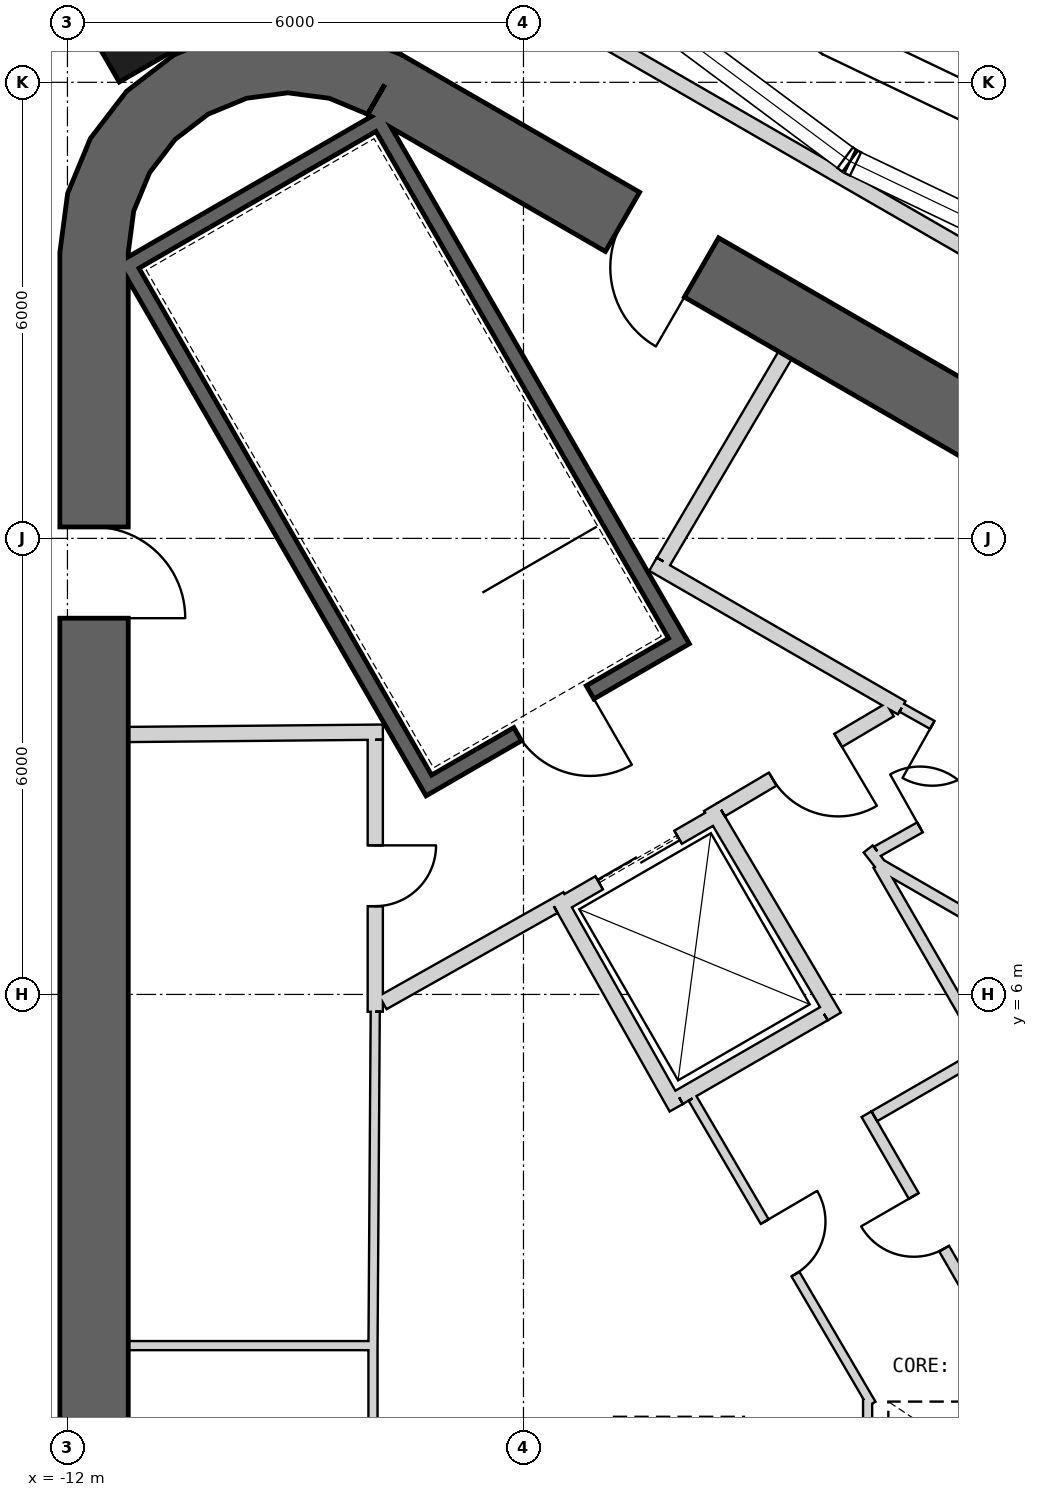
"""IFC4 building model, lengths in metres.
Left out: names, types, materials, properties, quantities, classifications, styles, units other than length and angle.
Written with IfcOpenShell. Run it as: python <this file> out.ifc"""

import sys

from ifc_helpers import new_model, si_unit, direction, frame, frame_2d, origin, origin_2d, place, context, subcontext, project, spatial, polyline, rectangle, outline, extrude, element, fill, save


model = new_model("IFC4")
c1 = context("Model", 3, precision=1e-05, world=origin(), true_north=direction((0.0, 1.0)))
c2 = subcontext(c1, "Body", "Model", "MODEL_VIEW")
j1 = project(units=[si_unit("LENGTHUNIT", "METRE"), si_unit("PLANEANGLEUNIT", "RADIAN")], contexts=[c1])
p1 = place(None, origin())
s1 = spatial("IfcSite", under=j1, at=p1, CompositionType="ELEMENT")
p2 = place(p1, origin())
s2 = spatial("IfcBuilding", under=s1, at=p2, CompositionType="ELEMENT")
p3 = place(p2, frame((0.0, 0.0, 440.3)))
s3 = spatial("IfcBuildingStorey", under=s2, at=p3, CompositionType="ELEMENT", Elevation=440.3)
p4 = place(p3, frame((-11.025, 19.097, 0.0), z_axis=(0.0, 0.0, 1.0), x_axis=(-0.5, 0.866025403784, 0.0)))
e1 = element("IfcColumn", 1, at=p4, inside=s3, PredefinedType="COLUMN", context=c2, shape_type="SweptSolid", body=[
    extrude(rectangle(XDim=1.6, YDim=1.6, at=origin_2d()), origin(), (0.0, 0.0, 1.0), 4.7),
])
p5 = place(p3, frame((19.475, 2.208, 0.0), z_axis=(0.0, 0.0, 1.0), x_axis=(-0.866028369851, 0.499994862586, 0.0)))
e2 = element("IfcWall", 2, at=p5, inside=s3, PredefinedType="SHEAR", context=c2, shape_type="SweptSolid", body=[
    extrude(rectangle(XDim=31.523, YDim=0.9, at=frame_2d((15.762, 0.0))), origin(), (0.0, 0.0, 1.0), 4.7),
])
p6 = place(p5, frame((3.612, 0.0, 0.0)))
e3 = element("IfcOpeningElement", 3, at=p6, cuts=e2, PredefinedType="OPENING", context=c2, shape_type="SweptSolid", body=[
    extrude(rectangle(XDim=1.2, YDim=2.4, at=frame_2d((0.6, 1.2))), frame((0.0, 0.46, 0.0), z_axis=(0.0, -1.0, 0.0), x_axis=(1.0, 0.0, 0.0)), (0.0, 0.0, 1.0), 0.92),
])
p7 = place(p5, frame((26.712, 0.0, 0.0)))
e4 = element("IfcOpeningElement", 4, at=p7, cuts=e2, PredefinedType="OPENING", context=c2, shape_type="SweptSolid", body=[
    extrude(rectangle(XDim=1.2, YDim=2.4, at=frame_2d((0.6, 1.2))), frame((0.0, 0.46, 0.0), z_axis=(0.0, -1.0, 0.0), x_axis=(1.0, 0.0, 0.0)), (0.0, 0.0, 1.0), 0.92),
])
p8 = place(p3, frame((-11.65, 15.762, 0.0), z_axis=(0.0, 0.0, 1.0), x_axis=(0.0, -1.0, 0.0)))
e5 = element("IfcWall", 5, at=p8, inside=s3, PredefinedType="SHEAR", context=c2, shape_type="SweptSolid", body=[
    extrude(rectangle(XDim=31.523, YDim=0.9, at=frame_2d((15.762, 0.0))), origin(), (0.0, 0.0, 1.0), 4.7),
])
p9 = place(p8, frame((3.612, 0.0, 0.0)))
e6 = element("IfcOpeningElement", 6, at=p9, cuts=e5, PredefinedType="OPENING", context=c2, shape_type="SweptSolid", body=[
    extrude(rectangle(XDim=1.2, YDim=2.4, at=frame_2d((0.6, 1.2))), frame((0.0, 0.46, 0.0), z_axis=(0.0, -1.0, 0.0), x_axis=(1.0, 0.0, 0.0)), (0.0, 0.0, 1.0), 0.92),
])
p10 = place(p8, frame((26.712, 0.0, 0.0)))
e7 = element("IfcOpeningElement", 7, at=p10, cuts=e5, PredefinedType="OPENING", context=c2, shape_type="SweptSolid", body=[
    extrude(rectangle(XDim=1.2, YDim=2.4, at=frame_2d((0.6, 1.2))), frame((0.0, 0.46, 0.0), z_axis=(0.0, -1.0, 0.0), x_axis=(1.0, 0.0, 0.0)), (0.0, 0.0, 1.0), 0.92),
])
p11 = place(p3, origin())
e8 = element("IfcWall", 8, at=p11, inside=s3, PredefinedType="SHEAR", context=c2, shape_type="SweptSolid", body=[
    extrude(outline(polyline([(-7.6, 18.36), (-8.323, 18.659), (-9.1, 18.762), (-9.876, 18.659), (-10.6, 18.36), (-11.221, 17.883), (-11.698, 17.262), (-11.998, 16.538), (-12.1, 15.762), (-11.2, 15.762), (-11.128, 16.305), (-10.919, 16.812), (-10.585, 17.247), (-10.15, 17.58), (-9.644, 17.79), (-9.1, 17.862), (-8.556, 17.79), (-8.05, 17.58), (-7.6, 18.36)])), origin(), (0.0, 0.0, 1.0), 4.7),
])
p12 = place(p3, frame((-11.245, 15.678, -0.25), z_axis=(0.0, 0.0, 1.0), x_axis=(0.499977274689, -0.866038523851, 0.0)))
e9 = element("IfcWall", 9, at=p12, inside=s3, PredefinedType="SHEAR", context=c2, shape_type="SweptSolid", body=[
    extrude(rectangle(XDim=8.1, YDim=0.2, at=frame_2d((4.05, 0.0))), origin(), (0.0, 0.0, 1.0), 4.95),
])
p13 = place(p3, frame((-7.818, 17.541, -0.25), z_axis=(0.0, 0.0, 1.0), x_axis=(-0.866044365799, -0.499967155389, 0.0)))
e10 = element("IfcWall", 10, at=p13, inside=s3, PredefinedType="SHEAR", context=c2, shape_type="SweptSolid", body=[
    extrude(rectangle(XDim=3.8, YDim=0.2, at=frame_2d((1.9, 0.0))), origin(), (0.0, 0.0, 1.0), 4.95),
])
p14 = place(p3, frame((-7.854, 17.405, -0.25), z_axis=(0.0, 0.0, 1.0), x_axis=(0.499997992926, -0.866026562566, 0.0)))
e11 = element("IfcWall", 11, at=p14, inside=s3, PredefinedType="SHEAR", context=c2, shape_type="SweptSolid", body=[
    extrude(rectangle(XDim=7.9, YDim=0.2, at=frame_2d((3.95, 0.0))), origin(), (0.0, 0.0, 1.0), 4.95),
])
p15 = place(p3, frame((-7.159, 8.8, -0.25), z_axis=(0.0, 0.0, 1.0), x_axis=(0.866047807691, 0.499961193289, 0.0)))
e12 = element("IfcWall", 12, at=p15, inside=s3, PredefinedType="SHEAR", context=c2, shape_type="SweptSolid", body=[
    extrude(rectangle(XDim=3.6, YDim=0.2, at=frame_2d((1.8, 0.0))), origin(), (0.0, 0.0, 1.0), 4.95),
])
p16 = place(p15, frame((1.25, 0.0, 0.25)))
e13 = element("IfcOpeningElement", 13, at=p16, cuts=e12, PredefinedType="OPENING", context=c2, shape_type="SweptSolid", body=[
    extrude(rectangle(XDim=1.1, YDim=2.1, at=frame_2d((0.55, 1.05))), frame((0.0, 0.11, 0.0), z_axis=(0.0, -1.0, 0.0), x_axis=(1.0, 0.0, 0.0)), (0.0, 0.0, 1.0), 0.22),
])
p17 = place(p3, frame((-5.524, 7.168, 0.0), z_axis=(0.0, 0.0, 1.0), x_axis=(0.866024647952, 0.500001309137, 0.0)))
e14 = element("IfcWall", 14, at=p17, inside=s3, PredefinedType="PLUMBINGWALL", context=c2, shape_type="SweptSolid", body=[
    extrude(rectangle(XDim=2.4, YDim=0.2, at=frame_2d((1.2, 0.0))), origin(), (0.0, 0.0, 1.0), 4.7),
])
p18 = place(p17, frame((0.6, 0.0, 0.0)))
e15 = element("IfcOpeningElement", 15, at=p18, cuts=e14, PredefinedType="OPENING", context=c2, shape_type="SweptSolid", body=[
    extrude(rectangle(XDim=1.2, YDim=2.4, at=frame_2d((0.6, 1.2))), frame((0.0, 0.11, 0.0), z_axis=(0.0, -1.0, 0.0), x_axis=(1.0, 0.0, 0.0)), (0.0, 0.0, 1.0), 0.22),
])
p19 = place(p3, frame((-2.047, 5.746, 0.0), z_axis=(0.0, 0.0, 1.0), x_axis=(-0.86605622881, -0.499946605688, 0.0)))
e16 = element("IfcWall", 16, at=p19, inside=s3, PredefinedType="PLUMBINGWALL", context=c2, shape_type="SweptSolid", body=[
    extrude(rectangle(XDim=2.2, YDim=0.2, at=frame_2d((1.1, 0.0))), origin(), (0.0, 0.0, 1.0), 4.7),
])
p20 = place(p3, frame((-3.99, 4.509, 0.0), z_axis=(0.0, 0.0, 1.0), x_axis=(-0.491358283181, 0.870957540612, 0.0)))
e17 = element("IfcWall", 17, at=p20, inside=s3, PredefinedType="PLUMBINGWALL", context=c2, shape_type="SweptSolid", body=[
    extrude(rectangle(XDim=3.2, YDim=0.2, at=frame_2d((1.6, 0.0))), origin(), (0.0, 0.0, 1.0), 4.7),
])
p21 = place(p3, frame((-3.538, 8.465, 0.0), z_axis=(0.0, 0.0, 1.0), x_axis=(0.508616218331, -0.860993346345, 0.0)))
e18 = element("IfcWall", 18, at=p21, inside=s3, PredefinedType="PLUMBINGWALL", context=c2, shape_type="SweptSolid", body=[
    extrude(rectangle(XDim=3.2, YDim=0.2, at=frame_2d((1.6, 0.0))), origin(), (0.0, 0.0, 1.0), 4.7),
])
p22 = place(p3, frame((-11.2, 1.38, 0.0), z_axis=(0.0, 0.0, 1.0), x_axis=(1.0, 0.0, 0.0)))
e19 = element("IfcWall", 19, at=p22, inside=s3, PredefinedType="PARTITIONING", context=c2, shape_type="SweptSolid", body=[
    extrude(rectangle(XDim=3.25, YDim=0.12, at=frame_2d((1.625, 0.0))), origin(), (0.0, 0.0, 1.0), 4.7),
])
p23 = place(p3, frame((-7.85, 9.451, 0.0), z_axis=(0.0, 0.0, 1.0), x_axis=(-0.999957167047, -0.009255488683, 0.0)))
e20 = element("IfcWall", 20, at=p23, inside=s3, PredefinedType="PARTITIONING", context=c2, shape_type="SweptSolid", body=[
    extrude(rectangle(XDim=3.35, YDim=0.2, at=frame_2d((1.675, 0.0))), origin(), (0.0, 0.0, 1.0), 4.7),
])
p24 = place(p3, frame((-7.95, 5.772, 0.0), z_axis=(0.0, 0.0, 1.0), x_axis=(0.0, 1.0, 0.0)))
e21 = element("IfcWall", 21, at=p24, inside=s3, PredefinedType="PARTITIONING", context=c2, shape_type="SweptSolid", body=[
    extrude(rectangle(XDim=3.578, YDim=0.2, at=frame_2d((1.789, 0.0))), origin(), (0.0, 0.0, 1.0), 4.7),
])
p25 = place(p24, frame((1.389, 0.0, 0.0)))
e22 = element("IfcOpeningElement", 22, at=p25, cuts=e21, PredefinedType="OPENING", context=c2, shape_type="SweptSolid", body=[
    extrude(rectangle(XDim=0.8, YDim=2.1, at=frame_2d((0.4, 1.05))), frame((0.0, 0.11, 0.0), z_axis=(0.0, -1.0, 0.0), x_axis=(1.0, 0.0, 0.0)), (0.0, 0.0, 1.0), 0.22),
])
p26 = place(p3, frame((-7.95, 5.772, 0.0), z_axis=(0.0, 0.0, 1.0), x_axis=(-0.006679767059, -0.999977690107, 0.0)))
e23 = element("IfcWall", 23, at=p26, inside=s3, PredefinedType="PARTITIONING", context=c2, shape_type="SweptSolid", body=[
    extrude(rectangle(XDim=4.422, YDim=0.12, at=frame_2d((2.211, 0.0))), origin(), (0.0, 0.0, 1.0), 4.7),
])
p27 = place(p3, frame((-7.98, 1.35, 0.0), z_axis=(0.0, 0.0, 1.0), x_axis=(0.0, -1.0, 0.0)))
e24 = element("IfcWall", 24, at=p27, inside=s3, PredefinedType="PARTITIONING", context=c2, shape_type="SweptSolid", body=[
    extrude(rectangle(XDim=5.4, YDim=0.12, at=frame_2d((2.7, 0.0))), origin(), (0.0, 0.0, 1.0), 4.7),
])
p28 = place(p27, frame((2.3, 0.0, 0.0)))
e25 = element("IfcOpeningElement", 25, at=p28, cuts=e24, PredefinedType="OPENING", context=c2, shape_type="SweptSolid", body=[
    extrude(rectangle(XDim=0.8, YDim=2.1, at=frame_2d((0.4, 1.05))), frame((0.0, 0.07, 0.0), z_axis=(0.0, -1.0, 0.0), x_axis=(1.0, 0.0, 0.0)), (0.0, 0.0, 1.0), 0.14),
])
p29 = place(p3, frame((-4.296, 11.66, 0.0), z_axis=(0.0, 0.0, 1.0), x_axis=(0.866027389382, -0.499996560828, 0.0)))
e26 = element("IfcWall", 26, at=p29, inside=s3, PredefinedType="PARTITIONING", context=c2, shape_type="SweptSolid", body=[
    extrude(rectangle(XDim=3.778, YDim=0.2, at=frame_2d((1.889, 0.0))), origin(), (0.0, 0.0, 1.0), 4.7),
])
p30 = place(p3, frame((-2.558, 14.409, 0.0), z_axis=(0.0, 0.0, 1.0), x_axis=(-0.508018930956, -0.861345903683, 0.0)))
e27 = element("IfcWall", 27, at=p30, inside=s3, PredefinedType="PARTITIONING", context=c2, shape_type="SweptSolid", body=[
    extrude(rectangle(XDim=3.15, YDim=0.2, at=frame_2d((1.575, 0.0))), origin(), (0.0, 0.0, 1.0), 4.7),
])
p31 = place(p3, frame((-1.024, 9.772, 0.0), z_axis=(0.0, 0.0, 1.0), x_axis=(0.871968924608, -0.489561226527, 0.0)))
e28 = element("IfcWall", 28, at=p31, inside=s3, PredefinedType="PARTITIONING", context=c2, shape_type="SweptSolid", body=[
    extrude(rectangle(XDim=1.722, YDim=0.12, at=frame_2d((0.861, 0.0))), origin(), (0.0, 0.0, 1.0), 4.7),
])
p32 = place(p31, frame((0.461, 0.0, 0.0)))
e29 = element("IfcOpeningElement", 29, at=p32, cuts=e28, PredefinedType="OPENING", context=c2, shape_type="SweptSolid", body=[
    extrude(rectangle(XDim=0.8, YDim=2.1, at=frame_2d((0.4, 1.05))), frame((0.0, 0.07, 0.0), z_axis=(0.0, -1.0, 0.0), x_axis=(1.0, 0.0, 0.0)), (0.0, 0.0, 1.0), 0.14),
])
p33 = place(p3, frame((-5.6, 7.16, 0.0), z_axis=(0.0, 0.0, 1.0), x_axis=(-0.871350695252, -0.490660744185, 0.0)))
e30 = element("IfcWall", 30, at=p33, inside=s3, PredefinedType="PARTITIONING", context=c2, shape_type="SweptSolid", body=[
    extrude(rectangle(XDim=2.582, YDim=0.2, at=frame_2d((1.291, 0.0))), origin(), (0.0, 0.0, 1.0), 4.7),
])
p34 = place(p3, frame((-1.179, 9.745, 0.0), z_axis=(0.0, 0.0, 1.0), x_axis=(-0.860630814782, -0.509229418482, 0.0)))
e31 = element("IfcWall", 31, at=p34, inside=s3, PredefinedType="PARTITIONING", context=c2, shape_type="SweptSolid", body=[
    extrude(rectangle(XDim=2.582, YDim=0.2, at=frame_2d((1.291, 0.0))), origin(), (0.0, 0.0, 1.0), 4.7),
])
p35 = place(p34, frame((0.791, 0.0, 0.0)))
e32 = element("IfcOpeningElement", 32, at=p35, cuts=e31, PredefinedType="OPENING", context=c2, shape_type="SweptSolid", body=[
    extrude(rectangle(XDim=1.0, YDim=2.1, at=frame_2d((0.5, 1.05))), frame((0.0, 0.11, 0.0), z_axis=(0.0, -1.0, 0.0), x_axis=(1.0, 0.0, 0.0)), (0.0, 0.0, 1.0), 0.22),
])
p36 = place(p3, frame((-1.42, 0.612, 0.0), z_axis=(0.0, 0.0, 1.0), x_axis=(-0.505492266403, 0.862831135627, 0.0)))
e33 = element("IfcWall", 33, at=p36, inside=s3, PredefinedType="PARTITIONING", context=c2, shape_type="SweptSolid", body=[
    extrude(rectangle(XDim=4.66, YDim=0.12, at=frame_2d((2.33, 0.0))), origin(), (0.0, 0.0, 1.0), 4.7),
])
p37 = place(p36, frame((1.981, 0.0, 0.0)))
e34 = element("IfcOpeningElement", 34, at=p37, cuts=e33, PredefinedType="OPENING", context=c2, shape_type="SweptSolid", body=[
    extrude(rectangle(XDim=0.8, YDim=2.1, at=frame_2d((0.4, 1.05))), frame((0.0, 0.07, 0.0), z_axis=(0.0, -1.0, 0.0), x_axis=(1.0, 0.0, 0.0)), (0.0, 0.0, 1.0), 0.14),
])
p38 = place(p3, frame((-1.472, -0.802, 0.0), z_axis=(0.0, 0.0, 1.0), x_axis=(0.0, 1.0, 0.0)))
e35 = element("IfcWall", 35, at=p38, inside=s3, PredefinedType="PARTITIONING", context=c2, shape_type="SweptSolid", body=[
    extrude(rectangle(XDim=1.484, YDim=0.12, at=frame_2d((0.742, 0.0))), origin(), (0.0, 0.0, 1.0), 4.7),
])
p39 = place(p3, frame((7.367, 2.7, 0.0), z_axis=(0.0, 0.0, 1.0), x_axis=(-0.866027158831, 0.499996960157, 0.0)))
e36 = element("IfcWall", 36, at=p39, inside=s3, PredefinedType="PLUMBINGWALL", context=c2, shape_type="SweptSolid", body=[
    extrude(rectangle(XDim=10.06, YDim=0.15, at=frame_2d((5.03, 0.0))), origin(), (0.0, 0.0, 1.0), 4.7),
])
p40 = place(p3, frame((-1.465, 7.914, 0.0), z_axis=(0.0, 0.0, 1.0), x_axis=(0.613555553277, -0.789651557994, 0.0)))
e37 = element("IfcWall", 37, at=p40, inside=s3, PredefinedType="PLUMBINGWALL", context=c2, shape_type="SweptSolid", body=[
    extrude(rectangle(XDim=0.263, YDim=0.15, at=frame_2d((0.132, 0.0))), origin(), (0.0, 0.0, 1.0), 4.7),
])
p41 = place(p3, frame((0.475, 8.905, 0.0), z_axis=(0.0, 0.0, 1.0), x_axis=(-0.871859457225, -0.489756150392, 0.0)))
e38 = element("IfcWall", 38, at=p41, inside=s3, PredefinedType="PLUMBINGWALL", context=c2, shape_type="SweptSolid", body=[
    extrude(rectangle(XDim=2.089, YDim=0.15, at=frame_2d((1.044, 0.0))), origin(), (0.0, 0.0, 1.0), 4.7),
])
p42 = place(p41, frame((0.644, 0.0, 0.0)))
e39 = element("IfcOpeningElement", 39, at=p42, cuts=e38, PredefinedType="OPENING", context=c2, shape_type="SweptSolid", body=[
    extrude(rectangle(XDim=0.8, YDim=2.1, at=frame_2d((0.4, 1.05))), frame((0.0, 0.085, 0.0), z_axis=(0.0, -1.0, 0.0), x_axis=(1.0, 0.0, 0.0)), (0.0, 0.0, 1.0), 0.17),
])
p43 = place(p3, frame((-1.486, 4.425, 0.0), z_axis=(0.0, 0.0, 1.0), x_axis=(0.499992422807, -0.866029778435, 0.0)))
e40 = element("IfcWall", 40, at=p43, inside=s3, PredefinedType="PLUMBINGWALL", context=c2, shape_type="SweptSolid", body=[
    extrude(rectangle(XDim=3.209, YDim=0.15, at=frame_2d((1.605, 0.0))), origin(), (0.0, 0.0, 1.0), 4.7),
])
p44 = place(p43, frame((1.242, 0.0, 0.0)))
e41 = element("IfcOpeningElement", 41, at=p44, cuts=e40, PredefinedType="OPENING", context=c2, shape_type="SweptSolid", body=[
    extrude(rectangle(XDim=0.8, YDim=2.1, at=frame_2d((0.4, 1.05))), frame((0.0, 0.085, 0.0), z_axis=(0.0, -1.0, 0.0), x_axis=(1.0, 0.0, 0.0)), (0.0, 0.0, 1.0), 0.17),
])
p45 = place(p3, frame((0.153, 5.285, 0.0), z_axis=(0.0, 0.0, 1.0), x_axis=(-0.866059624469, -0.499940723351, 0.0)))
e42 = element("IfcWall", 42, at=p45, inside=s3, PredefinedType="PLUMBINGWALL", context=c2, shape_type="SweptSolid", body=[
    extrude(rectangle(XDim=1.775, YDim=0.15, at=frame_2d((0.888, 0.0))), origin(), (0.0, 0.0, 1.0), 4.7),
])
p46 = place(p3, frame((-1.33, 7.704, 0.0), z_axis=(0.0, 0.0, 1.0), x_axis=(0.499980071345, -0.866036909293, 0.0)))
e43 = element("IfcWall", 43, at=p46, inside=s3, PredefinedType="PLUMBINGWALL", context=c2, shape_type="SweptSolid", body=[
    extrude(rectangle(XDim=2.762, YDim=0.15, at=frame_2d((1.381, 0.0))), origin(), (0.0, 0.0, 1.0), 4.7),
])
p47 = place(p3, frame((20.834, 3.675, 0.0), z_axis=(0.0, 0.0, 1.0), x_axis=(-0.866028536494, 0.499994573949, 0.0)))
e44 = element("IfcWall", 44, at=p47, inside=s3, PredefinedType="PARTITIONING", context=c2, shape_type="SweptSolid", body=[
    extrude(rectangle(XDim=32.411, YDim=0.2, at=frame_2d((16.206, 0.0))), origin(), (0.0, 0.0, 1.0), 4.7),
])
p48 = place(p47, frame((7.7, 0.0, 0.0)))
e45 = element("IfcOpeningElement", 45, at=p48, cuts=e44, PredefinedType="OPENING", context=c2, shape_type="SweptSolid", body=[
    extrude(rectangle(XDim=1.0, YDim=2.1, at=frame_2d((0.5, 1.05))), frame((0.0, 0.11, 0.0), z_axis=(0.0, -1.0, 0.0), x_axis=(1.0, 0.0, 0.0)), (0.0, 0.0, 1.0), 0.22),
])
p49 = place(p47, frame((18.006, 0.0, 0.0)))
e46 = element("IfcOpeningElement", 46, at=p49, cuts=e44, PredefinedType="OPENING", context=c2, shape_type="SweptSolid", body=[
    extrude(rectangle(XDim=1.0, YDim=2.1, at=frame_2d((0.5, 1.05))), frame((0.0, 0.11, 0.0), z_axis=(0.0, -1.0, 0.0), x_axis=(1.0, 0.0, 0.0)), (0.0, 0.0, 1.0), 0.22),
])
p50 = place(p2, frame((0.0, 0.0, 445.3)))
p51 = place(p50, frame((0.0, 0.0, -0.3)))
p52 = place(p51, frame((0.0, -0.157, 0.0)))
p53 = place(p52, frame((0.0, 0.0, 0.25)))
e47 = element("IfcWindow", 47, at=p53, inside=s3, PartitioningType="SINGLE_PANEL", PredefinedType="SKYLIGHT", context=c2, shape_type="SweptSolid", body=[
    extrude(rectangle(XDim=2.4, YDim=1.6, at=origin_2d()), origin(), (0.0, 0.0, 1.0), 0.05),
])
p54 = place(p51, frame((-4.0, -0.157, 0.0)))
p55 = place(p54, frame((0.0, 0.0, 0.25)))
e48 = element("IfcWindow", 48, at=p55, inside=s3, PartitioningType="SINGLE_PANEL", PredefinedType="SKYLIGHT", context=c2, shape_type="SweptSolid", body=[
    extrude(rectangle(XDim=1.8, YDim=1.2, at=origin_2d()), origin(), (0.0, 0.0, 1.0), 0.05),
])
p56 = place(p16, origin())
e49 = element("IfcDoor", 49, at=p56, inside=s3, OperationType="SINGLE_SWING_RIGHT", PredefinedType="USERDEFINED", context=c2, shape_type="SweptSolid", body=[
    extrude(rectangle(XDim=1.1, YDim=2.1, at=frame_2d((0.55, 1.05))), frame((0.0, 0.025, 0.0), z_axis=(0.0, -1.0, 0.0), x_axis=(1.0, 0.0, 0.0)), (0.0, 0.0, 1.0), 0.05),
])
fill(e13, e49)
p57 = place(p35, origin())
e50 = element("IfcDoor", 50, at=p57, inside=s3, OperationType="SINGLE_SWING_LEFT", PredefinedType="USERDEFINED", context=c2, shape_type="SweptSolid", body=[
    extrude(rectangle(XDim=1.0, YDim=2.1, at=frame_2d((0.5, 1.05))), frame((0.0, 0.025, 0.0), z_axis=(0.0, -1.0, 0.0), x_axis=(1.0, 0.0, 0.0)), (0.0, 0.0, 1.0), 0.05),
])
fill(e32, e50)
p58 = place(p18, origin())
e51 = element("IfcDoor", 51, at=p58, inside=s3, OperationType="SLIDING_TO_LEFT", PredefinedType="USERDEFINED", context=c2, shape_type="SweptSolid", body=[
    extrude(rectangle(XDim=1.2, YDim=2.4, at=frame_2d((0.6, 1.2))), frame((0.0, 0.025, 0.0), z_axis=(0.0, -1.0, 0.0), x_axis=(1.0, 0.0, 0.0)), (0.0, 0.0, 1.0), 0.05),
])
fill(e15, e51)
p59 = place(p37, origin())
e52 = element("IfcDoor", 52, at=p59, inside=s3, OperationType="SINGLE_SWING_RIGHT", PredefinedType="USERDEFINED", context=c2, shape_type="SweptSolid", body=[
    extrude(rectangle(XDim=0.8, YDim=2.1, at=frame_2d((0.4, 1.05))), frame((0.0, 0.025, 0.0), z_axis=(0.0, -1.0, 0.0), x_axis=(1.0, 0.0, 0.0)), (0.0, 0.0, 1.0), 0.05),
])
fill(e34, e52)
p60 = place(p42, origin())
e53 = element("IfcDoor", 53, at=p60, inside=s3, OperationType="SINGLE_SWING_RIGHT", PredefinedType="USERDEFINED", context=c2, shape_type="SweptSolid", body=[
    extrude(rectangle(XDim=0.8, YDim=2.1, at=frame_2d((0.4, 1.05))), frame((0.0, 0.025, 0.0), z_axis=(0.0, -1.0, 0.0), x_axis=(1.0, 0.0, 0.0)), (0.0, 0.0, 1.0), 0.05),
])
fill(e39, e53)
p61 = place(p44, origin())
e54 = element("IfcDoor", 54, at=p61, inside=s3, OperationType="SINGLE_SWING_LEFT", PredefinedType="USERDEFINED", context=c2, shape_type="SweptSolid", body=[
    extrude(rectangle(XDim=0.8, YDim=2.1, at=frame_2d((0.4, 1.05))), frame((0.0, 0.025, 0.0), z_axis=(0.0, -1.0, 0.0), x_axis=(1.0, 0.0, 0.0)), (0.0, 0.0, 1.0), 0.05),
])
fill(e41, e54)
p62 = place(p25, origin())
e55 = element("IfcDoor", 55, at=p62, inside=s3, OperationType="SINGLE_SWING_RIGHT", PredefinedType="USERDEFINED", context=c2, shape_type="SweptSolid", body=[
    extrude(rectangle(XDim=0.8, YDim=2.1, at=frame_2d((0.4, 1.05))), frame((0.0, 0.025, 0.0), z_axis=(0.0, -1.0, 0.0), x_axis=(1.0, 0.0, 0.0)), (0.0, 0.0, 1.0), 0.05),
])
fill(e22, e55)
p63 = place(p32, origin())
e56 = element("IfcDoor", 56, at=p63, inside=s3, OperationType="SINGLE_SWING_LEFT", PredefinedType="USERDEFINED", context=c2, shape_type="SweptSolid", body=[
    extrude(rectangle(XDim=0.8, YDim=2.1, at=frame_2d((0.4, 1.05))), frame((0.0, 0.025, 0.0), z_axis=(0.0, -1.0, 0.0), x_axis=(1.0, 0.0, 0.0)), (0.0, 0.0, 1.0), 0.05),
])
fill(e29, e56)
p64 = place(p7, origin())
e57 = element("IfcDoor", 57, at=p64, inside=s3, OperationType="SINGLE_SWING_LEFT", PredefinedType="USERDEFINED", context=c2, shape_type="SweptSolid", body=[
    extrude(rectangle(XDim=1.2, YDim=2.4, at=frame_2d((0.6, 1.2))), frame((0.0, 0.025, 0.0), z_axis=(0.0, -1.0, 0.0), x_axis=(1.0, 0.0, 0.0)), (0.0, 0.0, 1.0), 0.05),
])
fill(e4, e57)
p65 = place(p9, origin())
e58 = element("IfcDoor", 58, at=p65, inside=s3, OperationType="SINGLE_SWING_RIGHT", PredefinedType="USERDEFINED", context=c2, shape_type="SweptSolid", body=[
    extrude(rectangle(XDim=1.2, YDim=2.4, at=frame_2d((0.6, 1.2))), frame((0.0, 0.025, 0.0), z_axis=(0.0, -1.0, 0.0), x_axis=(1.0, 0.0, 0.0)), (0.0, 0.0, 1.0), 0.05),
])
fill(e6, e58)
save(model, sys.argv[1])
